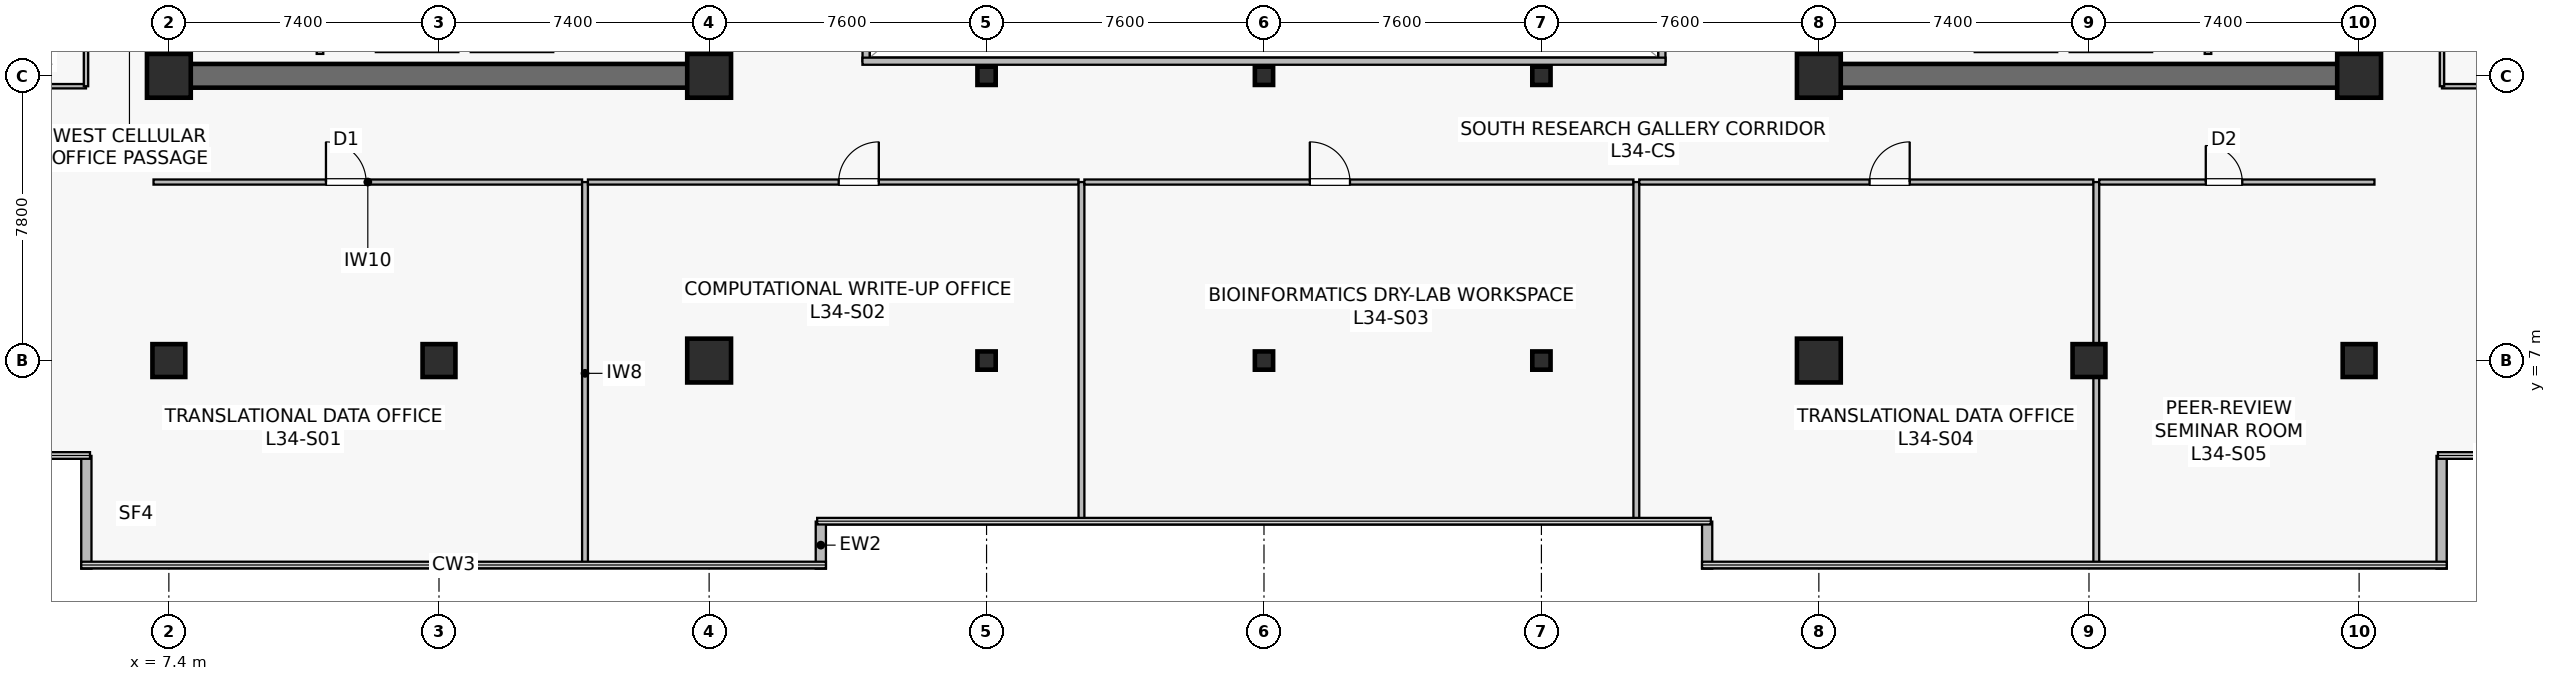
"""IFC4 building model, lengths in metres.
Left out: names, types, materials, properties, quantities, classifications, styles, units other than length and angle.
Written with IfcOpenShell. Run it as: python <this file> out.ifc"""

import sys

from ifc_helpers import new_model, si_unit, direction, frame, frame_2d, origin, origin_2d, place, context, subcontext, project, spatial, rectangle, hollow_rectangle, extrude, source, transform, mapped, element, fill, save


model = new_model("IFC4")
c1 = context("Model", 3, precision=1e-05, world=origin(), true_north=direction((0.0, 1.0)))
c2 = subcontext(c1, "Body", "Model", "MODEL_VIEW")
j1 = project(units=[si_unit("LENGTHUNIT", "METRE"), si_unit("PLANEANGLEUNIT", "RADIAN")], contexts=[c1])
p1 = place(None, origin())
s1 = spatial("IfcSite", under=j1, at=p1, CompositionType="ELEMENT")
p2 = place(p1, origin())
s2 = spatial("IfcBuilding", under=s1, at=p2, CompositionType="ELEMENT")
p3 = place(p2, frame((0.0, 0.0, 142.0)))
s3 = spatial("IfcBuildingStorey", under=s2, at=p3, CompositionType="ELEMENT", Elevation=142.0)
p4 = place(p3, frame((7.075, 14.8, 0.0), z_axis=(0.0, 0.0, 1.0), x_axis=(1.0, 0.0, 0.0)))
e1 = element("IfcWall", 1, at=p4, inside=s3, PredefinedType="SHEAR", context=c2, shape_type="SweptSolid", body=[
    extrude(rectangle(XDim=15.45, YDim=0.65, at=frame_2d((7.725, 0.0))), origin(), (0.0, 0.0, 1.0), 3.79),
])
p5 = place(p3, frame((7.4, 15.125, 0.0), z_axis=(0.0, 0.0, 1.0), x_axis=(0.0, 1.0, 0.0)))
e2 = element("IfcWall", 2, at=p5, inside=s3, PredefinedType="SHEAR", context=c2, shape_type="SweptSolid", body=[
    extrude(rectangle(XDim=18.35, YDim=0.65, at=frame_2d((9.175, 0.0))), origin(), (0.0, 0.0, 1.0), 3.79),
])
p6 = place(p3, frame((22.2, 15.125, 0.0), z_axis=(0.0, 0.0, 1.0), x_axis=(0.0, 1.0, 0.0)))
e3 = element("IfcWall", 3, at=p6, inside=s3, PredefinedType="SHEAR", context=c2, shape_type="SweptSolid", body=[
    extrude(rectangle(XDim=18.35, YDim=0.65, at=frame_2d((9.175, 0.0))), origin(), (0.0, 0.0, 1.0), 3.79),
])
p7 = place(p6, frame((3.425, 0.0, 0.0)))
e4 = element("IfcOpeningElement", 4, at=p7, cuts=e3, PredefinedType="OPENING", context=c2, shape_type="SweptSolid", body=[
    extrude(rectangle(XDim=1.42, YDim=2.2, at=frame_2d((0.71, 1.1))), frame((0.0, 0.335, 0.0), z_axis=(0.0, -1.0, 0.0), x_axis=(1.0, 0.0, 0.0)), (0.0, 0.0, 1.0), 0.67),
])
p8 = place(p3, frame((52.275, 14.8, 0.0), z_axis=(0.0, 0.0, 1.0), x_axis=(1.0, 0.0, 0.0)))
e5 = element("IfcWall", 5, at=p8, inside=s3, PredefinedType="SHEAR", context=c2, shape_type="SweptSolid", body=[
    extrude(rectangle(XDim=15.45, YDim=0.65, at=frame_2d((7.725, 0.0))), origin(), (0.0, 0.0, 1.0), 3.79),
])
p9 = place(p3, frame((52.6, 15.125, 0.0), z_axis=(0.0, 0.0, 1.0), x_axis=(0.0, 1.0, 0.0)))
e6 = element("IfcWall", 6, at=p9, inside=s3, PredefinedType="SHEAR", context=c2, shape_type="SweptSolid", body=[
    extrude(rectangle(XDim=18.35, YDim=0.65, at=frame_2d((9.175, 0.0))), origin(), (0.0, 0.0, 1.0), 3.79),
])
p10 = place(p9, frame((3.425, 0.0, 0.0)))
e7 = element("IfcOpeningElement", 7, at=p10, cuts=e6, PredefinedType="OPENING", context=c2, shape_type="SweptSolid", body=[
    extrude(rectangle(XDim=1.42, YDim=2.2, at=frame_2d((0.71, 1.1))), frame((0.0, 0.335, 0.0), z_axis=(0.0, -1.0, 0.0), x_axis=(1.0, 0.0, 0.0)), (0.0, 0.0, 1.0), 0.67),
])
p11 = place(p3, frame((67.4, 15.125, 0.0), z_axis=(0.0, 0.0, 1.0), x_axis=(0.0, 1.0, 0.0)))
e8 = element("IfcWall", 8, at=p11, inside=s3, PredefinedType="SHEAR", context=c2, shape_type="SweptSolid", body=[
    extrude(rectangle(XDim=18.35, YDim=0.65, at=frame_2d((9.175, 0.0))), origin(), (0.0, 0.0, 1.0), 3.79),
])
m1 = source(origin(), c2, "Body", "SweptSolid", [
    extrude(rectangle(XDim=0.9, YDim=0.9, at=origin_2d()), origin(), (0.0, 0.0, 1.0), 4.1),
])
p12 = place(p3, frame((14.8, 7.0, 0.0), z_axis=(0.0, 0.0, 1.0), x_axis=(1.0, 0.0, 0.0)))
e9 = element("IfcColumn", 9, at=p12, inside=s3, PredefinedType="COLUMN", context=c2, shape_type="MappedRepresentation", body=[
    mapped(m1, transform((0.0, 0.0, 0.0), scale=1.0)),
])
m2 = source(origin(), c2, "Body", "SweptSolid", [
    extrude(rectangle(XDim=1.2, YDim=1.2, at=origin_2d()), origin(), (0.0, 0.0, 1.0), 4.1),
])
for number, where, z_axis, x_axis in (
    (10, (22.2, 7.0, 0.0), (0.0, 0.0, 1.0), (1.0, 0.0, 0.0)),
    (11, (7.4, 14.8, 0.0), (0.0, 0.0, 1.0), (1.0, 0.0, 0.0)),
    (12, (22.2, 14.8, 0.0), (0.0, 0.0, 1.0), (1.0, 0.0, 0.0)),
    (13, (52.6, 7.0, 0.0), (0.0, 0.0, 1.0), (1.0, 0.0, 0.0)),
):
    element("IfcColumn", number, at=place(p3, frame(where, z_axis=z_axis, x_axis=x_axis)), inside=s3, PredefinedType="COLUMN", context=c2, shape_type="MappedRepresentation", body=[
        mapped(m2, transform((0.0, 0.0, 0.0), scale=1.0)),
    ])
p13 = place(p3, frame((60.0, 7.0, 0.0), z_axis=(0.0, 0.0, 1.0), x_axis=(1.0, 0.0, 0.0)))
e14 = element("IfcColumn", 14, at=p13, inside=s3, PredefinedType="COLUMN", context=c2, shape_type="MappedRepresentation", body=[
    mapped(m1, transform((0.0, 0.0, 0.0), scale=1.0)),
])
for number, where, z_axis, x_axis in (
    (15, (52.6, 14.8, 0.0), (0.0, 0.0, 1.0), (1.0, 0.0, 0.0)),
    (16, (67.4, 14.8, 0.0), (0.0, 0.0, 1.0), (1.0, 0.0, 0.0)),
):
    element("IfcColumn", number, at=place(p3, frame(where, z_axis=z_axis, x_axis=x_axis)), inside=s3, PredefinedType="COLUMN", context=c2, shape_type="MappedRepresentation", body=[
        mapped(m2, transform((0.0, 0.0, 0.0), scale=1.0)),
    ])
for number, where, z_axis, x_axis in (
    (17, (7.4, 7.0, 0.0), (0.0, 0.0, 1.0), (1.0, 0.0, 0.0)),
    (18, (67.4, 7.0, 0.0), (0.0, 0.0, 1.0), (1.0, 0.0, 0.0)),
):
    element("IfcColumn", number, at=place(p3, frame(where, z_axis=z_axis, x_axis=x_axis)), inside=s3, PredefinedType="COLUMN", context=c2, shape_type="MappedRepresentation", body=[
        mapped(m1, transform((0.0, 0.0, 0.0), scale=1.0)),
    ])
m3 = source(origin(), c2, "Body", "SweptSolid", [
    extrude(hollow_rectangle(XDim=0.5, YDim=0.5, WallThickness=0.022, at=origin_2d()), origin(), (0.0, 0.0, 1.0), 4.1),
])
for number, where, z_axis, x_axis in (
    (19, (29.8, 7.0, 0.0), (0.0, 0.0, 1.0), (1.0, 0.0, 0.0)),
    (20, (29.8, 14.8, 0.0), (0.0, 0.0, 1.0), (1.0, 0.0, 0.0)),
    (21, (37.4, 7.0, 0.0), (0.0, 0.0, 1.0), (1.0, 0.0, 0.0)),
    (22, (37.4, 14.8, 0.0), (0.0, 0.0, 1.0), (1.0, 0.0, 0.0)),
    (23, (45.0, 7.0, 0.0), (0.0, 0.0, 1.0), (1.0, 0.0, 0.0)),
    (24, (45.0, 14.8, 0.0), (0.0, 0.0, 1.0), (1.0, 0.0, 0.0)),
):
    element("IfcColumn", number, at=place(p3, frame(where, z_axis=z_axis, x_axis=x_axis)), inside=s3, PredefinedType="COLUMN", context=c2, shape_type="MappedRepresentation", body=[
        mapped(m3, transform((0.0, 0.0, 0.0), scale=1.0)),
    ])
for number, where, z_axis, x_axis in (
    (25, (25.26, 1.3, 0.0), (0.0, 0.0, 1.0), (0.0, 1.0, 0.0)),
    (26, (49.54, 2.588, 0.0), (0.0, 0.0, 1.0), (0.0, -1.0, 0.0)),
):
    element("IfcWall", number, at=place(p3, frame(where, z_axis=z_axis, x_axis=x_axis)), inside=s3, PredefinedType="STANDARD", context=c2, shape_type="SweptSolid", body=[
        extrude(rectangle(XDim=1.288, YDim=0.28, at=frame_2d((0.644, 0.0))), origin(), (0.0, 0.0, 1.0), 3.79),
    ])
for number, where, z_axis, x_axis in (
    (27, (69.66, 1.3, 0.0), (0.0, 0.0, 1.0), (0.0, 1.0, 0.0)),
    (28, (5.14, 4.388, 0.0), (0.0, 0.0, 1.0), (0.0, -1.0, 0.0)),
):
    element("IfcWall", number, at=place(p3, frame(where, z_axis=z_axis, x_axis=x_axis)), inside=s3, PredefinedType="STANDARD", context=c2, shape_type="SweptSolid", body=[
        extrude(rectangle(XDim=3.088, YDim=0.28, at=frame_2d((1.544, 0.0))), origin(), (0.0, 0.0, 1.0), 3.79),
    ])
p14 = place(p3, frame((13.07, 15.55, 0.0), z_axis=(0.0, 0.0, 1.0), x_axis=(1.0, 0.0, 0.0)))
e29 = element("IfcWall", 29, at=p14, inside=s3, PredefinedType="SOLIDWALL", context=c2, shape_type="SweptSolid", body=[
    extrude(rectangle(XDim=2.26, YDim=0.2, at=frame_2d((1.13, 0.0))), origin(), (0.0, 0.0, 1.0), 3.125),
])
p15 = place(p3, frame((15.67, 15.55, 0.0), z_axis=(0.0, 0.0, 1.0), x_axis=(1.0, 0.0, 0.0)))
e30 = element("IfcWall", 30, at=p15, inside=s3, PredefinedType="SOLIDWALL", context=c2, shape_type="SweptSolid", body=[
    extrude(rectangle(XDim=2.26, YDim=0.2, at=frame_2d((1.13, 0.0))), origin(), (0.0, 0.0, 1.0), 3.79),
])
p16 = place(p3, frame((11.54, 15.4, 0.0), z_axis=(0.0, 0.0, 1.0), x_axis=(0.0, 1.0, 0.0)))
e31 = element("IfcWall", 31, at=p16, inside=s3, PredefinedType="SOLIDWALL", context=c2, shape_type="SweptSolid", body=[
    extrude(rectangle(XDim=2.4, YDim=0.18, at=frame_2d((1.2, 0.0))), origin(), (0.0, 0.0, 1.0), 3.79),
])
p17 = place(p3, frame((59.47, 15.55, 0.0), z_axis=(0.0, 0.0, 1.0), x_axis=(1.0, 0.0, 0.0)))
e32 = element("IfcWall", 32, at=p17, inside=s3, PredefinedType="SOLIDWALL", context=c2, shape_type="SweptSolid", body=[
    extrude(rectangle(XDim=2.26, YDim=0.2, at=frame_2d((1.13, 0.0))), origin(), (0.0, 0.0, 1.0), 3.125),
])
p18 = place(p3, frame((56.87, 15.55, 0.0), z_axis=(0.0, 0.0, 1.0), x_axis=(1.0, 0.0, 0.0)))
e33 = element("IfcWall", 33, at=p18, inside=s3, PredefinedType="SOLIDWALL", context=c2, shape_type="SweptSolid", body=[
    extrude(rectangle(XDim=2.26, YDim=0.2, at=frame_2d((1.13, 0.0))), origin(), (0.0, 0.0, 1.0), 3.79),
])
p19 = place(p3, frame((63.26, 15.4, 0.0), z_axis=(0.0, 0.0, 1.0), x_axis=(0.0, 1.0, 0.0)))
e34 = element("IfcWall", 34, at=p19, inside=s3, PredefinedType="SOLIDWALL", context=c2, shape_type="SweptSolid", body=[
    extrude(rectangle(XDim=2.4, YDim=0.18, at=frame_2d((1.2, 0.0))), origin(), (0.0, 0.0, 1.0), 3.79),
])
p20 = place(p3, frame((26.5, 15.2, 0.0), z_axis=(0.0, 0.0, 1.0), x_axis=(0.0, 1.0, 0.0)))
e35 = element("IfcWall", 35, at=p20, inside=s3, PredefinedType="SOLIDWALL", context=c2, shape_type="SweptSolid", body=[
    extrude(rectangle(XDim=18.2, YDim=0.195, at=frame_2d((9.1, 0.0))), origin(), (0.0, 0.0, 1.0), 3.79),
])
p21 = place(p20, frame((1.8, 0.0, 0.9)))
e36 = element("IfcOpeningElement", 36, at=p21, cuts=e35, PredefinedType="OPENING", context=c2, shape_type="SweptSolid", body=[
    extrude(rectangle(XDim=1.5, YDim=1.4, at=frame_2d((0.75, 0.7))), frame((0.0, 0.107, 0.0), z_axis=(0.0, -1.0, 0.0), x_axis=(1.0, 0.0, 0.0)), (0.0, 0.0, 1.0), 0.215),
])
p22 = place(p20, frame((13.2, 0.0, 0.9)))
e37 = element("IfcOpeningElement", 37, at=p22, cuts=e35, PredefinedType="OPENING", context=c2, shape_type="SweptSolid", body=[
    extrude(rectangle(XDim=1.5, YDim=1.4, at=frame_2d((0.75, 0.7))), frame((0.0, 0.107, 0.0), z_axis=(0.0, -1.0, 0.0), x_axis=(1.0, 0.0, 0.0)), (0.0, 0.0, 1.0), 0.215),
])
p23 = place(p3, frame((48.3, 15.2, 0.0), z_axis=(0.0, 0.0, 1.0), x_axis=(0.0, 1.0, 0.0)))
e38 = element("IfcWall", 38, at=p23, inside=s3, PredefinedType="SOLIDWALL", context=c2, shape_type="SweptSolid", body=[
    extrude(rectangle(XDim=18.2, YDim=0.195, at=frame_2d((9.1, 0.0))), origin(), (0.0, 0.0, 1.0), 3.79),
])
p24 = place(p23, frame((1.8, 0.0, 0.9)))
e39 = element("IfcOpeningElement", 39, at=p24, cuts=e38, PredefinedType="OPENING", context=c2, shape_type="SweptSolid", body=[
    extrude(rectangle(XDim=1.5, YDim=1.4, at=frame_2d((0.75, 0.7))), frame((0.0, 0.107, 0.0), z_axis=(0.0, -1.0, 0.0), x_axis=(1.0, 0.0, 0.0)), (0.0, 0.0, 1.0), 0.215),
])
p25 = place(p23, frame((13.2, 0.0, 0.9)))
e40 = element("IfcOpeningElement", 40, at=p25, cuts=e38, PredefinedType="OPENING", context=c2, shape_type="SweptSolid", body=[
    extrude(rectangle(XDim=1.5, YDim=1.4, at=frame_2d((0.75, 0.7))), frame((0.0, 0.107, 0.0), z_axis=(0.0, -1.0, 0.0), x_axis=(1.0, 0.0, 0.0)), (0.0, 0.0, 1.0), 0.215),
])
p26 = place(p3, frame((26.4, 15.2, 0.0), z_axis=(0.0, 0.0, 1.0), x_axis=(1.0, 0.0, 0.0)))
e41 = element("IfcWall", 41, at=p26, inside=s3, PredefinedType="SOLIDWALL", context=c2, shape_type="SweptSolid", body=[
    extrude(rectangle(XDim=22.0, YDim=0.195, at=frame_2d((11.0, 0.0))), origin(), (0.0, 0.0, 1.0), 3.79),
])
p27 = place(p3, frame((6.98, 11.89, 0.0), z_axis=(0.0, 0.0, 1.0), x_axis=(1.0, 0.0, 0.0)))
e42 = element("IfcWall", 42, at=p27, inside=s3, PredefinedType="PARTITIONING", context=c2, shape_type="SweptSolid", body=[
    extrude(rectangle(XDim=11.74, YDim=0.14, at=frame_2d((5.87, 0.0))), origin(), (0.0, 0.0, 1.0), 3.125),
])
p28 = place(p27, frame((4.724, 0.0, 0.0)))
e43 = element("IfcOpeningElement", 43, at=p28, cuts=e42, PredefinedType="OPENING", context=c2, shape_type="SweptSolid", body=[
    extrude(rectangle(XDim=1.1, YDim=2.18, at=frame_2d((0.55, 1.09))), frame((0.0, 0.08, 0.0), z_axis=(0.0, -1.0, 0.0), x_axis=(1.0, 0.0, 0.0)), (0.0, 0.0, 1.0), 0.16),
])
p29 = place(p3, frame((18.8, 1.41, 0.0), z_axis=(0.0, 0.0, 1.0), x_axis=(0.0, 1.0, 0.0)))
e44 = element("IfcWall", 44, at=p29, inside=s3, PredefinedType="PARTITIONING", context=c2, shape_type="SweptSolid", body=[
    extrude(rectangle(XDim=10.48, YDim=0.16, at=frame_2d((5.24, 0.0))), origin(), (0.0, 0.0, 1.0), 3.075),
])
p30 = place(p3, frame((18.88, 11.89, 0.0), z_axis=(0.0, 0.0, 1.0), x_axis=(1.0, 0.0, 0.0)))
e45 = element("IfcWall", 45, at=p30, inside=s3, PredefinedType="PARTITIONING", context=c2, shape_type="SweptSolid", body=[
    extrude(rectangle(XDim=13.44, YDim=0.14, at=frame_2d((6.72, 0.0))), origin(), (0.0, 0.0, 1.0), 3.125),
])
p31 = place(p30, frame((6.868, 0.0, 0.0)))
e46 = element("IfcOpeningElement", 46, at=p31, cuts=e45, PredefinedType="OPENING", context=c2, shape_type="SweptSolid", body=[
    extrude(rectangle(XDim=1.1, YDim=2.18, at=frame_2d((0.55, 1.09))), frame((0.0, 0.08, 0.0), z_axis=(0.0, -1.0, 0.0), x_axis=(1.0, 0.0, 0.0)), (0.0, 0.0, 1.0), 0.16),
])
p32 = place(p3, frame((32.4, 2.61, 0.0), z_axis=(0.0, 0.0, 1.0), x_axis=(0.0, 1.0, 0.0)))
e47 = element("IfcWall", 47, at=p32, inside=s3, PredefinedType="PARTITIONING", context=c2, shape_type="SweptSolid", body=[
    extrude(rectangle(XDim=9.28, YDim=0.16, at=frame_2d((4.64, 0.0))), origin(), (0.0, 0.0, 1.0), 3.075),
])
p33 = place(p3, frame((32.48, 11.89, 0.0), z_axis=(0.0, 0.0, 1.0), x_axis=(1.0, 0.0, 0.0)))
e48 = element("IfcWall", 48, at=p33, inside=s3, PredefinedType="PARTITIONING", context=c2, shape_type="SweptSolid", body=[
    extrude(rectangle(XDim=15.04, YDim=0.14, at=frame_2d((7.52, 0.0))), origin(), (0.0, 0.0, 1.0), 3.125),
])
p34 = place(p33, frame((6.176, 0.0, 0.0)))
e49 = element("IfcOpeningElement", 49, at=p34, cuts=e48, PredefinedType="OPENING", context=c2, shape_type="SweptSolid", body=[
    extrude(rectangle(XDim=1.1, YDim=2.18, at=frame_2d((0.55, 1.09))), frame((0.0, 0.08, 0.0), z_axis=(0.0, -1.0, 0.0), x_axis=(1.0, 0.0, 0.0)), (0.0, 0.0, 1.0), 0.16),
])
p35 = place(p3, frame((47.6, 2.61, 0.0), z_axis=(0.0, 0.0, 1.0), x_axis=(0.0, 1.0, 0.0)))
e50 = element("IfcWall", 50, at=p35, inside=s3, PredefinedType="PARTITIONING", context=c2, shape_type="SweptSolid", body=[
    extrude(rectangle(XDim=9.28, YDim=0.16, at=frame_2d((4.64, 0.0))), origin(), (0.0, 0.0, 1.0), 3.075),
])
p36 = place(p3, frame((47.68, 11.89, 0.0), z_axis=(0.0, 0.0, 1.0), x_axis=(1.0, 0.0, 0.0)))
e51 = element("IfcWall", 51, at=p36, inside=s3, PredefinedType="PARTITIONING", context=c2, shape_type="SweptSolid", body=[
    extrude(rectangle(XDim=12.44, YDim=0.14, at=frame_2d((6.22, 0.0))), origin(), (0.0, 0.0, 1.0), 3.125),
])
p37 = place(p36, frame((6.308, 0.0, 0.0)))
e52 = element("IfcOpeningElement", 52, at=p37, cuts=e51, PredefinedType="OPENING", context=c2, shape_type="SweptSolid", body=[
    extrude(rectangle(XDim=1.1, YDim=2.18, at=frame_2d((0.55, 1.09))), frame((0.0, 0.08, 0.0), z_axis=(0.0, -1.0, 0.0), x_axis=(1.0, 0.0, 0.0)), (0.0, 0.0, 1.0), 0.16),
])
p38 = place(p3, frame((60.2, 1.41, 0.0), z_axis=(0.0, 0.0, 1.0), x_axis=(0.0, 1.0, 0.0)))
e53 = element("IfcWall", 53, at=p38, inside=s3, PredefinedType="PARTITIONING", context=c2, shape_type="SweptSolid", body=[
    extrude(rectangle(XDim=10.48, YDim=0.16, at=frame_2d((5.24, 0.0))), origin(), (0.0, 0.0, 1.0), 3.075),
])
p39 = place(p3, frame((60.28, 11.89, 0.0), z_axis=(0.0, 0.0, 1.0), x_axis=(1.0, 0.0, 0.0)))
e54 = element("IfcWall", 54, at=p39, inside=s3, PredefinedType="PARTITIONING", context=c2, shape_type="SweptSolid", body=[
    extrude(rectangle(XDim=7.54, YDim=0.14, at=frame_2d((3.77, 0.0))), origin(), (0.0, 0.0, 1.0), 3.275),
])
p40 = place(p39, frame((2.92, 0.0, 0.0)))
e55 = element("IfcOpeningElement", 55, at=p40, cuts=e54, PredefinedType="OPENING", context=c2, shape_type="SweptSolid", body=[
    extrude(rectangle(XDim=1.0, YDim=2.15, at=frame_2d((0.5, 1.075))), frame((0.0, 0.08, 0.0), z_axis=(0.0, -1.0, 0.0), x_axis=(1.0, 0.0, 0.0)), (0.0, 0.0, 1.0), 0.16),
])
p41 = place(p3, frame((2.11, 14.515, 0.0), z_axis=(0.0, 0.0, 1.0), x_axis=(1.0, 0.0, 0.0)))
e56 = element("IfcWall", 56, at=p41, inside=s3, PredefinedType="PARTITIONING", context=c2, shape_type="SweptSolid", body=[
    extrude(rectangle(XDim=3.02, YDim=0.12, at=frame_2d((1.51, 0.0))), origin(), (0.0, 0.0, 1.0), 3.79),
])
p42 = place(p3, frame((5.13, 14.515, 0.0), z_axis=(0.0, 0.0, 1.0), x_axis=(0.0, 1.0, 0.0)))
e57 = element("IfcWall", 57, at=p42, inside=s3, PredefinedType="PARTITIONING", context=c2, shape_type="SweptSolid", body=[
    extrude(rectangle(XDim=10.025, YDim=0.12, at=frame_2d((5.013, 0.0))), origin(), (0.0, 0.0, 1.0), 3.79),
])
p43 = place(p42, frame((4.562, 0.0, 0.0)))
e58 = element("IfcOpeningElement", 58, at=p43, cuts=e57, PredefinedType="OPENING", context=c2, shape_type="SweptSolid", body=[
    extrude(rectangle(XDim=0.9, YDim=2.1, at=frame_2d((0.45, 1.05))), frame((0.0, 0.07, 0.0), z_axis=(0.0, -1.0, 0.0), x_axis=(1.0, 0.0, 0.0)), (0.0, 0.0, 1.0), 0.14),
])
p44 = place(p3, frame((69.67, 14.515, 0.0), z_axis=(0.0, 0.0, 1.0), x_axis=(1.0, 0.0, 0.0)))
e59 = element("IfcWall", 59, at=p44, inside=s3, PredefinedType="PARTITIONING", context=c2, shape_type="SweptSolid", body=[
    extrude(rectangle(XDim=3.02, YDim=0.12, at=frame_2d((1.51, 0.0))), origin(), (0.0, 0.0, 1.0), 3.79),
])
p45 = place(p3, frame((69.67, 14.515, 0.0), z_axis=(0.0, 0.0, 1.0), x_axis=(0.0, 1.0, 0.0)))
e60 = element("IfcWall", 60, at=p45, inside=s3, PredefinedType="PARTITIONING", context=c2, shape_type="SweptSolid", body=[
    extrude(rectangle(XDim=5.225, YDim=0.12, at=frame_2d((2.613, 0.0))), origin(), (0.0, 0.0, 1.0), 3.79),
])
p46 = place(p45, frame((2.163, 0.0, 0.0)))
e61 = element("IfcOpeningElement", 61, at=p46, cuts=e60, PredefinedType="OPENING", context=c2, shape_type="SweptSolid", body=[
    extrude(rectangle(XDim=0.9, YDim=2.1, at=frame_2d((0.45, 1.05))), frame((0.0, 0.07, 0.0), z_axis=(0.0, -1.0, 0.0), x_axis=(1.0, 0.0, 0.0)), (0.0, 0.0, 1.0), 0.14),
])
m4 = source(origin(), c2, "Body", "SweptSolid", [
    extrude(rectangle(XDim=1.1, YDim=2.18, at=frame_2d((0.55, 1.09))), frame((0.0, 0.025, 0.0), z_axis=(0.0, -1.0, 0.0), x_axis=(1.0, 0.0, 0.0)), (0.0, 0.0, 1.0), 0.05),
])
p47 = place(p28, origin())
e62 = element("IfcDoor", 62, at=p47, inside=s3, OperationType="SINGLE_SWING_LEFT", PredefinedType="DOOR", context=c2, shape_type="MappedRepresentation", body=[
    mapped(m4, transform((0.0, 0.0, 0.0), scale=1.0)),
])
fill(e43, e62)
p48 = place(p31, origin())
e63 = element("IfcDoor", 63, at=p48, inside=s3, OperationType="SINGLE_SWING_RIGHT", PredefinedType="DOOR", context=c2, shape_type="MappedRepresentation", body=[
    mapped(m4, transform((0.0, 0.0, 0.0), scale=1.0)),
])
fill(e46, e63)
p49 = place(p34, origin())
e64 = element("IfcDoor", 64, at=p49, inside=s3, OperationType="SINGLE_SWING_LEFT", PredefinedType="DOOR", context=c2, shape_type="MappedRepresentation", body=[
    mapped(m4, transform((0.0, 0.0, 0.0), scale=1.0)),
])
fill(e49, e64)
p50 = place(p37, origin())
e65 = element("IfcDoor", 65, at=p50, inside=s3, OperationType="SINGLE_SWING_RIGHT", PredefinedType="DOOR", context=c2, shape_type="MappedRepresentation", body=[
    mapped(m4, transform((0.0, 0.0, 0.0), scale=1.0)),
])
fill(e52, e65)
m5 = source(origin(), c2, "Body", "SweptSolid", [
    extrude(rectangle(XDim=1.0, YDim=2.15, at=frame_2d((0.5, 1.075))), frame((0.0, 0.025, 0.0), z_axis=(0.0, -1.0, 0.0), x_axis=(1.0, 0.0, 0.0)), (0.0, 0.0, 1.0), 0.05),
])
p51 = place(p40, origin())
e66 = element("IfcDoor", 66, at=p51, inside=s3, OperationType="SINGLE_SWING_LEFT", PredefinedType="DOOR", context=c2, shape_type="MappedRepresentation", body=[
    mapped(m5, transform((0.0, 0.0, 0.0), scale=1.0)),
])
fill(e55, e66)
save(model, sys.argv[1])
